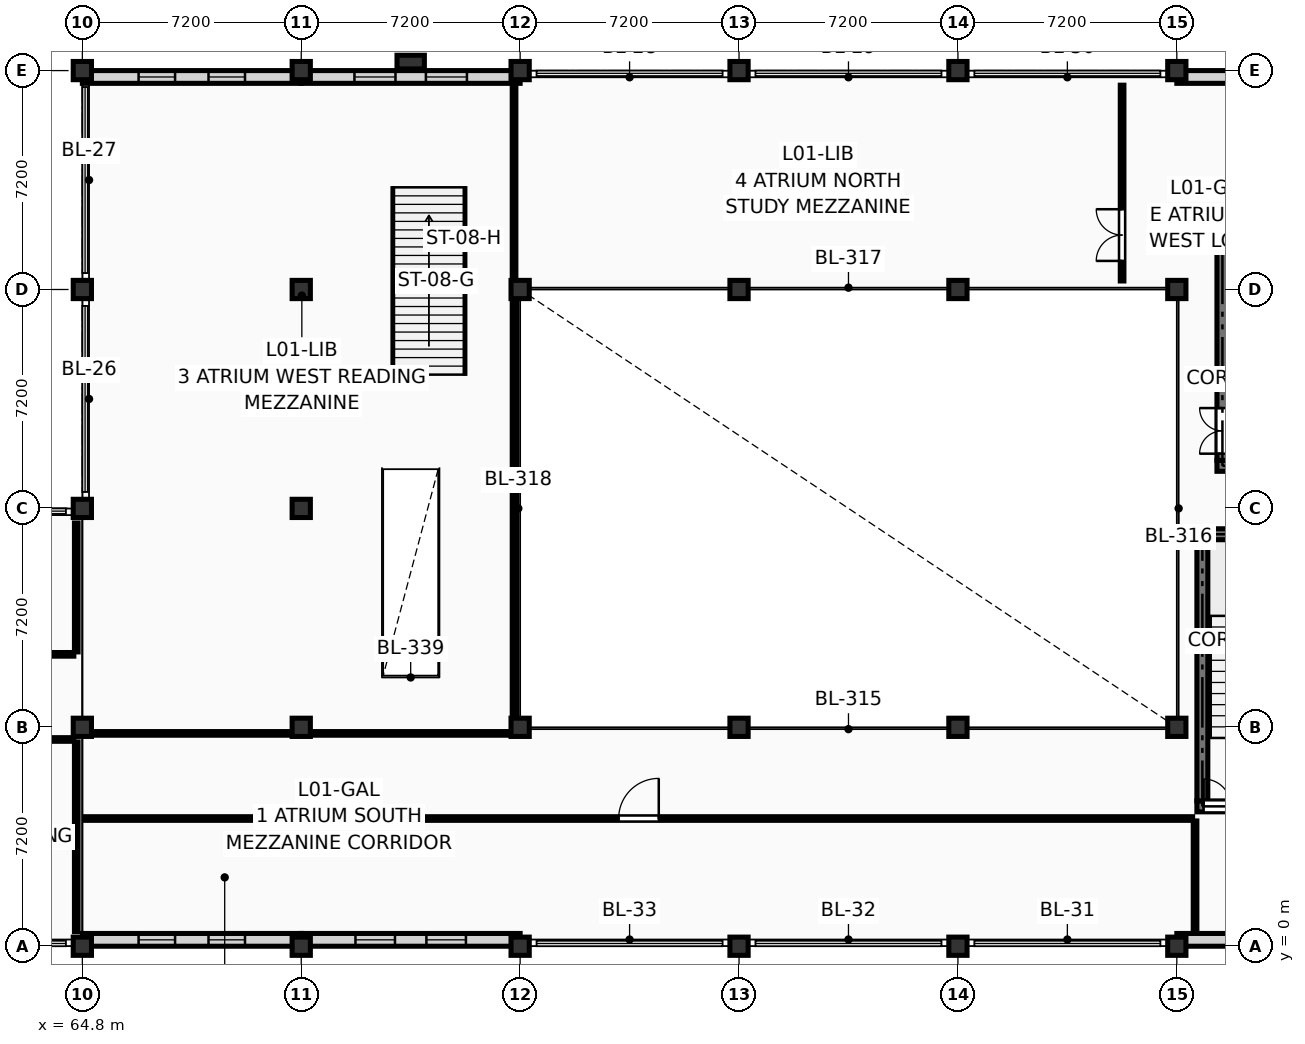
"""IFC4 building model, lengths in metres.
Left out: names, types, materials, properties, quantities, classifications, styles, units other than length and angle.
Written with IfcOpenShell. Run it as: python <this file> out.ifc"""

import sys

from ifc_helpers import new_model, si_unit, direction, frame, frame_2d, origin, origin_2d, place, context, subcontext, project, spatial, rectangle, extrude, element, fill, save


model = new_model("IFC4")
c1 = context("Model", 3, precision=1e-05, world=origin(), true_north=direction((0.0, 1.0)))
c2 = subcontext(c1, "Body", "Model", "MODEL_VIEW")
j1 = project(units=[si_unit("LENGTHUNIT", "METRE"), si_unit("PLANEANGLEUNIT", "RADIAN")], contexts=[c1])
p1 = place(None, origin())
s1 = spatial("IfcSite", under=j1, at=p1, CompositionType="ELEMENT")
p2 = place(p1, origin())
s2 = spatial("IfcBuilding", under=s1, at=p2, CompositionType="ELEMENT")
p3 = place(p2, frame((0.0, 0.0, 4.5)))
s3 = spatial("IfcBuildingStorey", under=s2, at=p3, CompositionType="ELEMENT", Elevation=4.5)
for number, where, z_axis, x_axis in (
    (1, (64.8, 0.0, 0.0), (0.0, 0.0, 1.0), (1.0, 0.0, 0.0)),
    (2, (64.8, 7.2, 0.0), (0.0, 0.0, 1.0), (1.0, 0.0, 0.0)),
    (3, (64.8, 14.4, 0.0), (0.0, 0.0, 1.0), (1.0, 0.0, 0.0)),
    (4, (64.8, 21.6, 0.0), (0.0, 0.0, 1.0), (1.0, 0.0, 0.0)),
    (5, (64.8, 28.8, 0.0), (0.0, 0.0, 1.0), (1.0, 0.0, 0.0)),
    (6, (72.0, 0.0, 0.0), (0.0, 0.0, 1.0), (1.0, 0.0, 0.0)),
    (7, (72.0, 7.2, 0.0), (0.0, 0.0, 1.0), (1.0, 0.0, 0.0)),
    (8, (72.0, 14.4, 0.0), (0.0, 0.0, 1.0), (1.0, 0.0, 0.0)),
    (9, (72.0, 21.6, 0.0), (0.0, 0.0, 1.0), (1.0, 0.0, 0.0)),
    (10, (72.0, 28.8, 0.0), (0.0, 0.0, 1.0), (1.0, 0.0, 0.0)),
    (11, (79.2, 0.0, 0.0), (0.0, 0.0, 1.0), (1.0, 0.0, 0.0)),
    (12, (79.2, 7.2, 0.0), (0.0, 0.0, 1.0), (1.0, 0.0, 0.0)),
    (13, (79.2, 21.6, 0.0), (0.0, 0.0, 1.0), (1.0, 0.0, 0.0)),
    (14, (79.2, 28.8, 0.0), (0.0, 0.0, 1.0), (1.0, 0.0, 0.0)),
    (15, (86.4, 0.0, 0.0), (0.0, 0.0, 1.0), (1.0, 0.0, 0.0)),
    (16, (86.4, 7.2, 0.0), (0.0, 0.0, 1.0), (1.0, 0.0, 0.0)),
    (17, (86.4, 21.6, 0.0), (0.0, 0.0, 1.0), (1.0, 0.0, 0.0)),
    (18, (86.4, 28.8, 0.0), (0.0, 0.0, 1.0), (1.0, 0.0, 0.0)),
    (19, (93.6, 0.0, 0.0), (0.0, 0.0, 1.0), (1.0, 0.0, 0.0)),
    (20, (93.6, 7.2, 0.0), (0.0, 0.0, 1.0), (1.0, 0.0, 0.0)),
    (21, (93.6, 21.6, 0.0), (0.0, 0.0, 1.0), (1.0, 0.0, 0.0)),
    (22, (93.6, 28.8, 0.0), (0.0, 0.0, 1.0), (1.0, 0.0, 0.0)),
    (23, (100.8, 0.0, 0.0), (0.0, 0.0, 1.0), (1.0, 0.0, 0.0)),
    (24, (100.8, 7.2, 0.0), (0.0, 0.0, 1.0), (1.0, 0.0, 0.0)),
    (25, (100.8, 21.6, 0.0), (0.0, 0.0, 1.0), (1.0, 0.0, 0.0)),
    (26, (100.8, 28.8, 0.0), (0.0, 0.0, 1.0), (1.0, 0.0, 0.0)),
):
    element("IfcColumn", number, at=place(p3, frame(where, z_axis=z_axis, x_axis=x_axis)), inside=s3, PredefinedType="COLUMN", context=c2, shape_type="SweptSolid", body=[
        extrude(rectangle(XDim=0.6, YDim=0.6, at=origin_2d()), origin(), (0.0, 0.0, 1.0), 4.05),
    ])
p4 = place(p3, frame((75.6, 29.08, 0.0), z_axis=(0.0, 0.0, 1.0), x_axis=(0.0, 1.0, 0.0)))
e27 = element("IfcColumn", 27, at=p4, inside=s3, PredefinedType="PILASTER", context=c2, shape_type="SweptSolid", body=[
    extrude(rectangle(XDim=0.45, YDim=0.9, at=origin_2d()), origin(), (0.0, 0.0, 1.0), 4.05),
])
p5 = place(p3, frame((64.8, 28.59, 0.0), z_axis=(0.0, 0.0, 1.0), x_axis=(1.0, 0.0, 0.0)))
e28 = element("IfcWall", 28, at=p5, inside=s3, PredefinedType="SOLIDWALL", context=c2, shape_type="SweptSolid", body=[
    extrude(rectangle(XDim=7.2, YDim=0.42, at=frame_2d((3.6, 0.0))), origin(), (0.0, 0.0, 1.0), 3.16),
])
p6 = place(p5, frame((1.85, 0.0, 0.45)))
e29 = element("IfcOpeningElement", 29, at=p6, cuts=e28, PredefinedType="OPENING", context=c2, shape_type="SweptSolid", body=[
    extrude(rectangle(XDim=1.2, YDim=2.35, at=frame_2d((0.6, 1.175))), frame((0.0, 0.222, 0.0), z_axis=(0.0, -1.0, 0.0), x_axis=(1.0, 0.0, 0.0)), (0.0, 0.0, 1.0), 0.444),
])
p7 = place(p5, frame((4.15, 0.0, 0.45)))
e30 = element("IfcOpeningElement", 30, at=p7, cuts=e28, PredefinedType="OPENING", context=c2, shape_type="SweptSolid", body=[
    extrude(rectangle(XDim=1.2, YDim=2.35, at=frame_2d((0.6, 1.175))), frame((0.0, 0.222, 0.0), z_axis=(0.0, -1.0, 0.0), x_axis=(1.0, 0.0, 0.0)), (0.0, 0.0, 1.0), 0.444),
])
p8 = place(p3, frame((72.0, 28.59, 0.0), z_axis=(0.0, 0.0, 1.0), x_axis=(1.0, 0.0, 0.0)))
e31 = element("IfcWall", 31, at=p8, inside=s3, PredefinedType="SOLIDWALL", context=c2, shape_type="SweptSolid", body=[
    extrude(rectangle(XDim=7.2, YDim=0.42, at=frame_2d((3.6, 0.0))), origin(), (0.0, 0.0, 1.0), 3.16),
])
p9 = place(p8, frame((1.75, 0.0, 0.45)))
e32 = element("IfcOpeningElement", 32, at=p9, cuts=e31, PredefinedType="OPENING", context=c2, shape_type="SweptSolid", body=[
    extrude(rectangle(XDim=1.35, YDim=2.45, at=frame_2d((0.675, 1.225))), frame((0.0, 0.222, 0.0), z_axis=(0.0, -1.0, 0.0), x_axis=(1.0, 0.0, 0.0)), (0.0, 0.0, 1.0), 0.444),
])
p10 = place(p8, frame((4.1, 0.0, 0.45)))
e33 = element("IfcOpeningElement", 33, at=p10, cuts=e31, PredefinedType="OPENING", context=c2, shape_type="SweptSolid", body=[
    extrude(rectangle(XDim=1.35, YDim=2.45, at=frame_2d((0.675, 1.225))), frame((0.0, 0.222, 0.0), z_axis=(0.0, -1.0, 0.0), x_axis=(1.0, 0.0, 0.0)), (0.0, 0.0, 1.0), 0.444),
])
p11 = place(p3, frame((100.8, 28.59, 0.0), z_axis=(0.0, 0.0, 1.0), x_axis=(1.0, 0.0, 0.0)))
e34 = element("IfcWall", 34, at=p11, inside=s3, PredefinedType="SOLIDWALL", context=c2, shape_type="SweptSolid", body=[
    extrude(rectangle(XDim=7.2, YDim=0.42, at=frame_2d((3.6, 0.0))), origin(), (0.0, 0.0, 1.0), 3.16),
])
p12 = place(p11, frame((1.65, 0.0, 0.45)))
e35 = element("IfcOpeningElement", 35, at=p12, cuts=e34, PredefinedType="OPENING", context=c2, shape_type="SweptSolid", body=[
    extrude(rectangle(XDim=1.5, YDim=2.4, at=frame_2d((0.75, 1.2))), frame((0.0, 0.222, 0.0), z_axis=(0.0, -1.0, 0.0), x_axis=(1.0, 0.0, 0.0)), (0.0, 0.0, 1.0), 0.444),
])
p13 = place(p11, frame((4.05, 0.0, 0.45)))
e36 = element("IfcOpeningElement", 36, at=p13, cuts=e34, PredefinedType="OPENING", context=c2, shape_type="SweptSolid", body=[
    extrude(rectangle(XDim=1.5, YDim=2.4, at=frame_2d((0.75, 1.2))), frame((0.0, 0.222, 0.0), z_axis=(0.0, -1.0, 0.0), x_axis=(1.0, 0.0, 0.0)), (0.0, 0.0, 1.0), 0.444),
])
p14 = place(p3, frame((100.8, 0.21, 0.0), z_axis=(0.0, 0.0, 1.0), x_axis=(1.0, 0.0, 0.0)))
e37 = element("IfcWall", 37, at=p14, inside=s3, PredefinedType="SOLIDWALL", context=c2, shape_type="SweptSolid", body=[
    extrude(rectangle(XDim=7.2, YDim=0.42, at=frame_2d((3.6, 0.0))), origin(), (0.0, 0.0, 1.0), 3.16),
])
p15 = place(p14, frame((1.717, 0.0, 0.45)))
e38 = element("IfcOpeningElement", 38, at=p15, cuts=e37, PredefinedType="OPENING", context=c2, shape_type="SweptSolid", body=[
    extrude(rectangle(XDim=1.4, YDim=2.38, at=frame_2d((0.7, 1.19))), frame((0.0, 0.222, 0.0), z_axis=(0.0, -1.0, 0.0), x_axis=(1.0, 0.0, 0.0)), (0.0, 0.0, 1.0), 0.444),
])
p16 = place(p14, frame((4.083, 0.0, 0.45)))
e39 = element("IfcOpeningElement", 39, at=p16, cuts=e37, PredefinedType="OPENING", context=c2, shape_type="SweptSolid", body=[
    extrude(rectangle(XDim=1.4, YDim=2.38, at=frame_2d((0.7, 1.19))), frame((0.0, 0.222, 0.0), z_axis=(0.0, -1.0, 0.0), x_axis=(1.0, 0.0, 0.0)), (0.0, 0.0, 1.0), 0.444),
])
p17 = place(p3, frame((72.0, 0.21, 0.0), z_axis=(0.0, 0.0, 1.0), x_axis=(1.0, 0.0, 0.0)))
e40 = element("IfcWall", 40, at=p17, inside=s3, PredefinedType="SOLIDWALL", context=c2, shape_type="SweptSolid", body=[
    extrude(rectangle(XDim=7.2, YDim=0.42, at=frame_2d((3.6, 0.0))), origin(), (0.0, 0.0, 1.0), 3.16),
])
p18 = place(p17, frame((1.783, 0.0, 0.45)))
e41 = element("IfcOpeningElement", 41, at=p18, cuts=e40, PredefinedType="OPENING", context=c2, shape_type="SweptSolid", body=[
    extrude(rectangle(XDim=1.3, YDim=2.35, at=frame_2d((0.65, 1.175))), frame((0.0, 0.222, 0.0), z_axis=(0.0, -1.0, 0.0), x_axis=(1.0, 0.0, 0.0)), (0.0, 0.0, 1.0), 0.444),
])
p19 = place(p17, frame((4.117, 0.0, 0.45)))
e42 = element("IfcOpeningElement", 42, at=p19, cuts=e40, PredefinedType="OPENING", context=c2, shape_type="SweptSolid", body=[
    extrude(rectangle(XDim=1.3, YDim=2.35, at=frame_2d((0.65, 1.175))), frame((0.0, 0.222, 0.0), z_axis=(0.0, -1.0, 0.0), x_axis=(1.0, 0.0, 0.0)), (0.0, 0.0, 1.0), 0.444),
])
p20 = place(p3, frame((64.8, 0.21, 0.0), z_axis=(0.0, 0.0, 1.0), x_axis=(1.0, 0.0, 0.0)))
e43 = element("IfcWall", 43, at=p20, inside=s3, PredefinedType="SOLIDWALL", context=c2, shape_type="SweptSolid", body=[
    extrude(rectangle(XDim=7.2, YDim=0.42, at=frame_2d((3.6, 0.0))), origin(), (0.0, 0.0, 1.0), 3.16),
])
p21 = place(p20, frame((1.85, 0.0, 0.45)))
e44 = element("IfcOpeningElement", 44, at=p21, cuts=e43, PredefinedType="OPENING", context=c2, shape_type="SweptSolid", body=[
    extrude(rectangle(XDim=1.2, YDim=2.35, at=frame_2d((0.6, 1.175))), frame((0.0, 0.222, 0.0), z_axis=(0.0, -1.0, 0.0), x_axis=(1.0, 0.0, 0.0)), (0.0, 0.0, 1.0), 0.444),
])
p22 = place(p20, frame((4.15, 0.0, 0.45)))
e45 = element("IfcOpeningElement", 45, at=p22, cuts=e43, PredefinedType="OPENING", context=c2, shape_type="SweptSolid", body=[
    extrude(rectangle(XDim=1.2, YDim=2.35, at=frame_2d((0.6, 1.175))), frame((0.0, 0.222, 0.0), z_axis=(0.0, -1.0, 0.0), x_axis=(1.0, 0.0, 0.0)), (0.0, 0.0, 1.0), 0.444),
])
for number, where, z_axis, x_axis in (
    (46, (102.12, 15.8, 0.0), (0.0, 0.0, 1.0), (1.0, 0.0, 0.0)),
    (47, (102.12, 23.4, 0.0), (0.0, 0.0, 1.0), (1.0, 0.0, 0.0)),
):
    element("IfcWall", number, at=place(p3, frame(where, z_axis=z_axis, x_axis=x_axis)), inside=s3, PredefinedType="SHEAR", context=c2, shape_type="SweptSolid", body=[
        extrude(rectangle(XDim=4.48, YDim=0.36, at=frame_2d((2.24, 0.0))), origin(), (0.0, 0.0, 1.0), 3.79),
    ])
p23 = place(p3, frame((102.3, 15.98, 0.0), z_axis=(0.0, 0.0, 1.0), x_axis=(0.0, 1.0, 0.0)))
e48 = element("IfcWall", 48, at=p23, inside=s3, PredefinedType="SHEAR", context=c2, shape_type="SweptSolid", body=[
    extrude(rectangle(XDim=7.24, YDim=0.36, at=frame_2d((3.62, 0.0))), origin(), (0.0, 0.0, 1.0), 3.79),
])
p24 = place(p23, frame((0.22, 0.0, 0.0)))
e49 = element("IfcOpeningElement", 49, at=p24, cuts=e48, PredefinedType="OPENING", context=c2, shape_type="SweptSolid", body=[
    extrude(rectangle(XDim=1.5, YDim=2.2, at=frame_2d((0.75, 1.1))), frame((0.0, 0.192, 0.0), z_axis=(0.0, -1.0, 0.0), x_axis=(1.0, 0.0, 0.0)), (0.0, 0.0, 1.0), 0.384),
])
p25 = place(p3, frame((101.46, 4.6, 0.0), z_axis=(0.0, 0.0, 1.0), x_axis=(1.0, 0.0, 0.0)))
e50 = element("IfcWall", 50, at=p25, inside=s3, PredefinedType="SHEAR", context=c2, shape_type="SweptSolid", body=[
    extrude(rectangle(XDim=5.88, YDim=0.36, at=frame_2d((2.94, 0.0))), origin(), (0.0, 0.0, 1.0), 3.79),
])
p26 = place(p25, frame((0.22, 0.0, 0.0)))
e51 = element("IfcOpeningElement", 51, at=p26, cuts=e50, PredefinedType="OPENING", context=c2, shape_type="SweptSolid", body=[
    extrude(rectangle(XDim=1.8, YDim=2.2, at=frame_2d((0.9, 1.1))), frame((0.0, 0.192, 0.0), z_axis=(0.0, -1.0, 0.0), x_axis=(1.0, 0.0, 0.0)), (0.0, 0.0, 1.0), 0.384),
])
p27 = place(p3, frame((101.46, 13.55, 0.0), z_axis=(0.0, 0.0, 1.0), x_axis=(1.0, 0.0, 0.0)))
e52 = element("IfcWall", 52, at=p27, inside=s3, PredefinedType="SHEAR", context=c2, shape_type="SweptSolid", body=[
    extrude(rectangle(XDim=5.88, YDim=0.36, at=frame_2d((2.94, 0.0))), origin(), (0.0, 0.0, 1.0), 3.79),
])
p28 = place(p3, frame((101.64, 4.78, 0.0), z_axis=(0.0, 0.0, 1.0), x_axis=(0.0, 1.0, 0.0)))
e53 = element("IfcWall", 53, at=p28, inside=s3, PredefinedType="SHEAR", context=c2, shape_type="SweptSolid", body=[
    extrude(rectangle(XDim=8.59, YDim=0.36, at=frame_2d((4.295, 0.0))), origin(), (0.0, 0.0, 1.0), 3.79),
])
p29 = place(p3, frame((64.6, 0.48, 0.0), z_axis=(0.0, 0.0, 1.0), x_axis=(0.0, 1.0, 0.0)))
e54 = element("IfcWall", 54, at=p29, inside=s3, PredefinedType="PARTITIONING", context=c2, shape_type="SweptSolid", body=[
    extrude(rectangle(XDim=6.24, YDim=0.12, at=frame_2d((3.12, 0.0))), origin(), (0.0, 0.0, 1.0), 2.925),
])
p30 = place(p3, frame((48.08, 6.8, 0.0), z_axis=(0.0, 0.0, 1.0), x_axis=(1.0, 0.0, 0.0)))
e55 = element("IfcWall", 55, at=p30, inside=s3, PredefinedType="PARTITIONING", context=c2, shape_type="SweptSolid", body=[
    extrude(rectangle(XDim=16.44, YDim=0.12, at=frame_2d((8.22, 0.0))), origin(), (0.0, 0.0, 1.0), 3.025),
])
p31 = place(p30, frame((6.031, 0.0, 0.0)))
e56 = element("IfcOpeningElement", 56, at=p31, cuts=e55, PredefinedType="OPENING", context=c2, shape_type="SweptSolid", body=[
    extrude(rectangle(XDim=1.32, YDim=2.2, at=frame_2d((0.66, 1.1))), frame((0.0, 0.072, 0.0), z_axis=(0.0, -1.0, 0.0), x_axis=(1.0, 0.0, 0.0)), (0.0, 0.0, 1.0), 0.144),
])
p32 = place(p3, frame((20.48, 9.6, 0.0), z_axis=(0.0, 0.0, 1.0), x_axis=(1.0, 0.0, 0.0)))
e57 = element("IfcWall", 57, at=p32, inside=s3, PredefinedType="PARTITIONING", context=c2, shape_type="SweptSolid", body=[
    extrude(rectangle(XDim=44.04, YDim=0.12, at=frame_2d((22.02, 0.0))), origin(), (0.0, 0.0, 1.0), 3.775),
])
p33 = place(p32, frame((20.479, 0.0, 0.0)))
e58 = element("IfcOpeningElement", 58, at=p33, cuts=e57, PredefinedType="OPENING", context=c2, shape_type="SweptSolid", body=[
    extrude(rectangle(XDim=1.32, YDim=2.2, at=frame_2d((0.66, 1.1))), frame((0.0, 0.072, 0.0), z_axis=(0.0, -1.0, 0.0), x_axis=(1.0, 0.0, 0.0)), (0.0, 0.0, 1.0), 0.144),
])
p34 = place(p3, frame((64.6, 9.68, 0.0), z_axis=(0.0, 0.0, 1.0), x_axis=(0.0, 1.0, 0.0)))
e59 = element("IfcWall", 59, at=p34, inside=s3, PredefinedType="PARTITIONING", context=c2, shape_type="SweptSolid", body=[
    extrude(rectangle(XDim=4.24, YDim=0.12, at=frame_2d((2.12, 0.0))), origin(), (0.0, 0.0, 1.0), 2.925),
])
p35 = place(p3, frame((101.4, 0.48, 0.0), z_axis=(0.0, 0.0, 1.0), x_axis=(0.0, 1.0, 0.0)))
e60 = element("IfcWall", 60, at=p35, inside=s3, PredefinedType="PARTITIONING", context=c2, shape_type="SweptSolid", body=[
    extrude(rectangle(XDim=3.64, YDim=0.12, at=frame_2d((1.82, 0.0))), origin(), (0.0, 0.0, 1.0), 3.775),
])
p36 = place(p3, frame((64.88, 4.2, 0.0), z_axis=(0.0, 0.0, 1.0), x_axis=(1.0, 0.0, 0.0)))
e61 = element("IfcWall", 61, at=p36, inside=s3, PredefinedType="PARTITIONING", context=c2, shape_type="SweptSolid", body=[
    extrude(rectangle(XDim=36.44, YDim=0.12, at=frame_2d((18.22, 0.0))), origin(), (0.0, 0.0, 1.0), 3.775),
])
p37 = place(p36, frame((17.56, 0.0, 0.0)))
e62 = element("IfcOpeningElement", 62, at=p37, cuts=e61, PredefinedType="OPENING", context=c2, shape_type="SweptSolid", body=[
    extrude(rectangle(XDim=1.32, YDim=2.2, at=frame_2d((0.66, 1.1))), frame((0.0, 0.072, 0.0), z_axis=(0.0, -1.0, 0.0), x_axis=(1.0, 0.0, 0.0)), (0.0, 0.0, 1.0), 0.144),
])
p38 = place(p3, frame((64.88, 7.0, 0.0), z_axis=(0.0, 0.0, 1.0), x_axis=(1.0, 0.0, 0.0)))
e63 = element("IfcWall", 63, at=p38, inside=s3, PredefinedType="PARTITIONING", context=c2, shape_type="SweptSolid", body=[
    extrude(rectangle(XDim=14.04, YDim=0.12, at=frame_2d((7.02, 0.0))), origin(), (0.0, 0.0, 1.0), 3.025),
])
p39 = place(p3, frame((79.0, 7.08, 0.0), z_axis=(0.0, 0.0, 1.0), x_axis=(0.0, 1.0, 0.0)))
e64 = element("IfcWall", 64, at=p39, inside=s3, PredefinedType="PARTITIONING", context=c2, shape_type="SweptSolid", body=[
    extrude(rectangle(XDim=21.24, YDim=0.12, at=frame_2d((10.62, 0.0))), origin(), (0.0, 0.0, 1.0), 3.775),
])
p40 = place(p3, frame((99.0, 21.88, 0.0), z_axis=(0.0, 0.0, 1.0), x_axis=(0.0, 1.0, 0.0)))
e65 = element("IfcWall", 65, at=p40, inside=s3, PredefinedType="PARTITIONING", context=c2, shape_type="SweptSolid", body=[
    extrude(rectangle(XDim=6.44, YDim=0.12, at=frame_2d((3.22, 0.0))), origin(), (0.0, 0.0, 1.0), 3.775),
])
p41 = place(p40, frame((0.66, 0.0, 0.0)))
e66 = element("IfcOpeningElement", 66, at=p41, cuts=e65, PredefinedType="OPENING", context=c2, shape_type="SweptSolid", body=[
    extrude(rectangle(XDim=1.7, YDim=2.28, at=frame_2d((0.85, 1.14))), frame((0.0, 0.072, 0.0), z_axis=(0.0, -1.0, 0.0), x_axis=(1.0, 0.0, 0.0)), (0.0, 0.0, 1.0), 0.144),
])
p42 = place(p6, origin())
e67 = element("IfcWindow", 67, at=p42, inside=s3, PartitioningType="SINGLE_PANEL", PredefinedType="WINDOW", context=c2, shape_type="SweptSolid", body=[
    extrude(rectangle(XDim=1.2, YDim=2.35, at=frame_2d((0.6, 1.175))), frame((0.0, 0.03, 0.0), z_axis=(0.0, -1.0, 0.0), x_axis=(1.0, 0.0, 0.0)), (0.0, 0.0, 1.0), 0.06),
])
fill(e29, e67)
p43 = place(p7, origin())
e68 = element("IfcWindow", 68, at=p43, inside=s3, PartitioningType="SINGLE_PANEL", PredefinedType="WINDOW", context=c2, shape_type="SweptSolid", body=[
    extrude(rectangle(XDim=1.2, YDim=2.35, at=frame_2d((0.6, 1.175))), frame((0.0, 0.03, 0.0), z_axis=(0.0, -1.0, 0.0), x_axis=(1.0, 0.0, 0.0)), (0.0, 0.0, 1.0), 0.06),
])
fill(e30, e68)
p44 = place(p9, origin())
e69 = element("IfcWindow", 69, at=p44, inside=s3, PartitioningType="SINGLE_PANEL", PredefinedType="WINDOW", context=c2, shape_type="SweptSolid", body=[
    extrude(rectangle(XDim=1.35, YDim=2.45, at=frame_2d((0.675, 1.225))), frame((0.0, 0.03, 0.0), z_axis=(0.0, -1.0, 0.0), x_axis=(1.0, 0.0, 0.0)), (0.0, 0.0, 1.0), 0.06),
])
fill(e32, e69)
p45 = place(p10, origin())
e70 = element("IfcWindow", 70, at=p45, inside=s3, PartitioningType="SINGLE_PANEL", PredefinedType="WINDOW", context=c2, shape_type="SweptSolid", body=[
    extrude(rectangle(XDim=1.35, YDim=2.45, at=frame_2d((0.675, 1.225))), frame((0.0, 0.03, 0.0), z_axis=(0.0, -1.0, 0.0), x_axis=(1.0, 0.0, 0.0)), (0.0, 0.0, 1.0), 0.06),
])
fill(e33, e70)
p46 = place(p18, origin())
e71 = element("IfcWindow", 71, at=p46, inside=s3, PartitioningType="SINGLE_PANEL", PredefinedType="WINDOW", context=c2, shape_type="SweptSolid", body=[
    extrude(rectangle(XDim=1.3, YDim=2.35, at=frame_2d((0.65, 1.175))), frame((0.0, 0.03, 0.0), z_axis=(0.0, -1.0, 0.0), x_axis=(1.0, 0.0, 0.0)), (0.0, 0.0, 1.0), 0.06),
])
fill(e41, e71)
p47 = place(p19, origin())
e72 = element("IfcWindow", 72, at=p47, inside=s3, PartitioningType="SINGLE_PANEL", PredefinedType="WINDOW", context=c2, shape_type="SweptSolid", body=[
    extrude(rectangle(XDim=1.3, YDim=2.35, at=frame_2d((0.65, 1.175))), frame((0.0, 0.03, 0.0), z_axis=(0.0, -1.0, 0.0), x_axis=(1.0, 0.0, 0.0)), (0.0, 0.0, 1.0), 0.06),
])
fill(e42, e72)
p48 = place(p21, origin())
e73 = element("IfcWindow", 73, at=p48, inside=s3, PartitioningType="SINGLE_PANEL", PredefinedType="WINDOW", context=c2, shape_type="SweptSolid", body=[
    extrude(rectangle(XDim=1.2, YDim=2.35, at=frame_2d((0.6, 1.175))), frame((0.0, 0.03, 0.0), z_axis=(0.0, -1.0, 0.0), x_axis=(1.0, 0.0, 0.0)), (0.0, 0.0, 1.0), 0.06),
])
fill(e44, e73)
p49 = place(p22, origin())
e74 = element("IfcWindow", 74, at=p49, inside=s3, PartitioningType="SINGLE_PANEL", PredefinedType="WINDOW", context=c2, shape_type="SweptSolid", body=[
    extrude(rectangle(XDim=1.2, YDim=2.35, at=frame_2d((0.6, 1.175))), frame((0.0, 0.03, 0.0), z_axis=(0.0, -1.0, 0.0), x_axis=(1.0, 0.0, 0.0)), (0.0, 0.0, 1.0), 0.06),
])
fill(e45, e74)
p50 = place(p24, origin())
e75 = element("IfcDoor", 75, at=p50, inside=s3, OperationType="DOUBLE_DOOR_SINGLE_SWING", PredefinedType="DOOR", context=c2, shape_type="SweptSolid", body=[
    extrude(rectangle(XDim=1.5, YDim=2.2, at=frame_2d((0.75, 1.1))), frame((0.0, 0.025, 0.0), z_axis=(0.0, -1.0, 0.0), x_axis=(1.0, 0.0, 0.0)), (0.0, 0.0, 1.0), 0.05),
])
fill(e49, e75)
p51 = place(p26, origin())
e76 = element("IfcDoor", 76, at=p51, inside=s3, OperationType="DOUBLE_DOOR_SINGLE_SWING", PredefinedType="DOOR", context=c2, shape_type="SweptSolid", body=[
    extrude(rectangle(XDim=1.8, YDim=2.2, at=frame_2d((0.9, 1.1))), frame((0.0, 0.025, 0.0), z_axis=(0.0, -1.0, 0.0), x_axis=(1.0, 0.0, 0.0)), (0.0, 0.0, 1.0), 0.05),
])
fill(e51, e76)
p52 = place(p37, origin())
e77 = element("IfcDoor", 77, at=p52, inside=s3, OperationType="SINGLE_SWING_RIGHT", PredefinedType="DOOR", context=c2, shape_type="SweptSolid", body=[
    extrude(rectangle(XDim=1.32, YDim=2.2, at=frame_2d((0.66, 1.1))), frame((0.0, 0.025, 0.0), z_axis=(0.0, -1.0, 0.0), x_axis=(1.0, 0.0, 0.0)), (0.0, 0.0, 1.0), 0.05),
])
fill(e62, e77)
p53 = place(p41, origin())
e78 = element("IfcDoor", 78, at=p53, inside=s3, OperationType="DOUBLE_DOOR_SINGLE_SWING", PredefinedType="DOOR", context=c2, shape_type="SweptSolid", body=[
    extrude(rectangle(XDim=1.7, YDim=2.28, at=frame_2d((0.85, 1.14))), frame((0.0, 0.025, 0.0), z_axis=(0.0, -1.0, 0.0), x_axis=(1.0, 0.0, 0.0)), (0.0, 0.0, 1.0), 0.05),
])
fill(e66, e78)
save(model, sys.argv[1])
